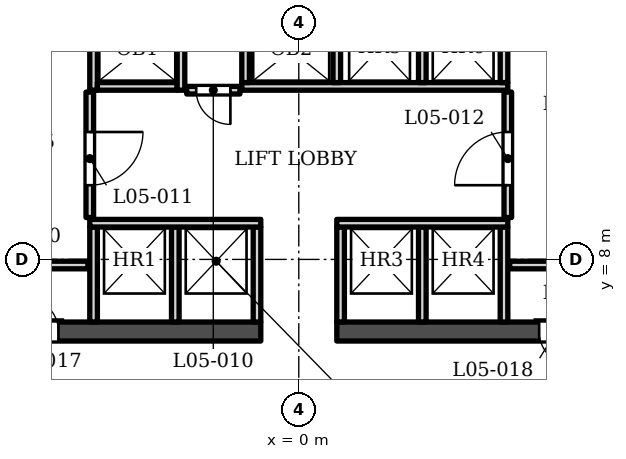
"""IFC4 building model, lengths in metres.
Left out: names, types, materials, properties, quantities, classifications, styles, units other than length and angle.
Written with IfcOpenShell. Run it as: python <this file> out.ifc"""

import sys

from ifc_helpers import new_model, si_unit, direction, frame, frame_2d, origin, place, context, subcontext, project, spatial, rectangle, extrude, element, fill, save


model = new_model("IFC4")
c1 = context("Model", 3, precision=1e-05, world=origin(), true_north=direction((0.0, 1.0)))
c2 = subcontext(c1, "Body", "Model", "MODEL_VIEW")
j1 = project(units=[si_unit("LENGTHUNIT", "METRE"), si_unit("PLANEANGLEUNIT", "RADIAN")], contexts=[c1])
p1 = place(None, origin())
s1 = spatial("IfcSite", under=j1, at=p1, CompositionType="ELEMENT")
p2 = place(p1, origin())
s2 = spatial("IfcBuilding", under=s1, at=p2, CompositionType="ELEMENT")
p3 = place(p2, frame((0.0, 0.0, 40.0)))
s3 = spatial("IfcBuildingStorey", under=s2, at=p3, CompositionType="ELEMENT", Elevation=40.0)
p4 = place(p3, frame((-8.05, 6.103, 0.0), z_axis=(0.0, 0.0, 1.0), x_axis=(1.0, 0.0, 0.0)))
e1 = element("IfcWall", 1, at=p4, inside=s3, PredefinedType="SHEAR", context=c2, shape_type="SweptSolid", body=[
    extrude(rectangle(XDim=7.05, YDim=0.5, at=frame_2d((3.525, 0.0))), origin(), (0.0, 0.0, 1.0), 6.0),
])
p5 = place(p4, frame((0.825, 0.0, 0.0)))
e2 = element("IfcOpeningElement", 2, at=p5, cuts=e1, PredefinedType="OPENING", context=c2, shape_type="SweptSolid", body=[
    extrude(rectangle(XDim=0.9, YDim=2.1, at=frame_2d((0.45, 1.05))), frame((0.0, 0.26, 0.0), z_axis=(0.0, -1.0, 0.0), x_axis=(1.0, 0.0, 0.0)), (0.0, 0.0, 1.0), 0.52),
])
p6 = place(p3, frame((1.0, 6.103, 0.0), z_axis=(0.0, 0.0, 1.0), x_axis=(1.0, 0.0, 0.0)))
e3 = element("IfcWall", 3, at=p6, inside=s3, PredefinedType="SHEAR", context=c2, shape_type="SweptSolid", body=[
    extrude(rectangle(XDim=7.05, YDim=0.5, at=frame_2d((3.525, 0.0))), origin(), (0.0, 0.0, 1.0), 6.0),
])
p7 = place(p6, frame((5.325, 0.0, 0.0)))
e4 = element("IfcOpeningElement", 4, at=p7, cuts=e3, PredefinedType="OPENING", context=c2, shape_type="SweptSolid", body=[
    extrude(rectangle(XDim=0.9, YDim=2.1, at=frame_2d((0.45, 1.05))), frame((0.0, 0.26, 0.0), z_axis=(0.0, -1.0, 0.0), x_axis=(1.0, 0.0, 0.0)), (0.0, 0.0, 1.0), 0.52),
])
for number, where, z_axis, x_axis in (
    (5, (-5.4, 6.353, 0.0), (0.0, 0.0, 1.0), (0.0, 1.0, 0.0)),
    (6, (-3.25, 6.353, 0.0), (0.0, 0.0, 1.0), (0.0, 1.0, 0.0)),
    (7, (-1.1, 6.353, 0.0), (0.0, 0.0, 1.0), (0.0, 1.0, 0.0)),
    (8, (1.1, 6.353, 0.0), (0.0, 0.0, 1.0), (0.0, 1.0, 0.0)),
    (9, (3.25, 6.353, 0.0), (0.0, 0.0, 1.0), (0.0, 1.0, 0.0)),
    (10, (5.4, 6.353, 0.0), (0.0, 0.0, 1.0), (0.0, 1.0, 0.0)),
    (11, (-8.05, 7.853, 0.0), (0.0, 0.0, 1.0), (1.0, 0.0, 0.0)),
    (12, (5.55, 7.853, 0.0), (0.0, 0.0, 1.0), (1.0, 0.0, 0.0)),
):
    element("IfcWall", number, at=place(p3, frame(where, z_axis=z_axis, x_axis=x_axis)), inside=s3, PredefinedType="SOLIDWALL", context=c2, shape_type="SweptSolid", body=[
        extrude(rectangle(XDim=2.5, YDim=0.2, at=frame_2d((1.25, 0.0))), origin(), (0.0, 0.0, 1.0), 5.55),
    ])
for number, where, z_axis, x_axis in (
    (13, (-5.5, 8.953, 0.0), (0.0, 0.0, 1.0), (1.0, 0.0, 0.0)),
    (14, (1.0, 8.953, 0.0), (0.0, 0.0, 1.0), (1.0, 0.0, 0.0)),
):
    element("IfcWall", number, at=place(p3, frame(where, z_axis=z_axis, x_axis=x_axis)), inside=s3, PredefinedType="SOLIDWALL", context=c2, shape_type="SweptSolid", body=[
        extrude(rectangle(XDim=4.5, YDim=0.2, at=frame_2d((2.25, 0.0))), origin(), (0.0, 0.0, 1.0), 5.55),
    ])
p8 = place(p3, frame((-5.5, 9.103, 0.0), z_axis=(0.0, 0.0, 1.0), x_axis=(0.0, 1.0, 0.0)))
e15 = element("IfcWall", 15, at=p8, inside=s3, PredefinedType="SOLIDWALL", context=c2, shape_type="SweptSolid", body=[
    extrude(rectangle(XDim=3.3, YDim=0.2, at=frame_2d((1.65, 0.0))), origin(), (0.0, 0.0, 1.0), 5.55),
])
p9 = place(p8, frame((0.85, 0.0, 0.0)))
e16 = element("IfcOpeningElement", 16, at=p9, cuts=e15, PredefinedType="OPENING", context=c2, shape_type="SweptSolid", body=[
    extrude(rectangle(XDim=1.4, YDim=2.1, at=frame_2d((0.7, 1.05))), frame((0.0, 0.11, 0.0), z_axis=(0.0, -1.0, 0.0), x_axis=(1.0, 0.0, 0.0)), (0.0, 0.0, 1.0), 0.22),
])
p10 = place(p3, frame((5.5, 9.103, 0.0), z_axis=(0.0, 0.0, 1.0), x_axis=(0.0, 1.0, 0.0)))
e17 = element("IfcWall", 17, at=p10, inside=s3, PredefinedType="SOLIDWALL", context=c2, shape_type="SweptSolid", body=[
    extrude(rectangle(XDim=3.3, YDim=0.2, at=frame_2d((1.65, 0.0))), origin(), (0.0, 0.0, 1.0), 5.55),
])
p11 = place(p10, frame((0.85, 0.0, 0.0)))
e18 = element("IfcOpeningElement", 18, at=p11, cuts=e17, PredefinedType="OPENING", context=c2, shape_type="SweptSolid", body=[
    extrude(rectangle(XDim=1.4, YDim=2.1, at=frame_2d((0.7, 1.05))), frame((0.0, 0.11, 0.0), z_axis=(0.0, -1.0, 0.0), x_axis=(1.0, 0.0, 0.0)), (0.0, 0.0, 1.0), 0.22),
])
p12 = place(p3, frame((-2.95, 12.453, 0.0), z_axis=(0.0, 0.0, 1.0), x_axis=(1.0, 0.0, 0.0)))
e19 = element("IfcWall", 19, at=p12, inside=s3, PredefinedType="SOLIDWALL", context=c2, shape_type="SweptSolid", body=[
    extrude(rectangle(XDim=1.4, YDim=0.2, at=frame_2d((0.7, 0.0))), origin(), (0.0, 0.0, 1.0), 5.55),
])
p13 = place(p12, frame((0.25, 0.0, 0.0)))
e20 = element("IfcOpeningElement", 20, at=p13, cuts=e19, PredefinedType="OPENING", context=c2, shape_type="SweptSolid", body=[
    extrude(rectangle(XDim=0.9, YDim=2.1, at=frame_2d((0.45, 1.05))), frame((0.0, 0.11, 0.0), z_axis=(0.0, -1.0, 0.0), x_axis=(1.0, 0.0, 0.0)), (0.0, 0.0, 1.0), 0.22),
])
p14 = place(p3, frame((-5.4, 12.453, 0.0), z_axis=(0.0, 0.0, 1.0), x_axis=(0.0, 1.0, 0.0)))
e21 = element("IfcWall", 21, at=p14, inside=s3, PredefinedType="SOLIDWALL", context=c2, shape_type="SweptSolid", body=[
    extrude(rectangle(XDim=3.0, YDim=0.2, at=frame_2d((1.5, 0.0))), origin(), (0.0, 0.0, 1.0), 5.55),
])
p15 = place(p3, frame((-5.3, 12.552, 0.0), z_axis=(0.0, 0.0, 1.0), x_axis=(1.0, 0.0, 0.0)))
e22 = element("IfcWall", 22, at=p15, inside=s3, PredefinedType="SOLIDWALL", context=c2, shape_type="SweptSolid", body=[
    extrude(rectangle(XDim=2.1, YDim=0.2, at=frame_2d((1.05, 0.0))), origin(), (0.0, 0.0, 1.0), 5.55),
])
p16 = place(p3, frame((-3.1, 12.453, 0.0), z_axis=(0.0, 0.0, 1.0), x_axis=(0.0, 1.0, 0.0)))
e23 = element("IfcWall", 23, at=p16, inside=s3, PredefinedType="SOLIDWALL", context=c2, shape_type="SweptSolid", body=[
    extrude(rectangle(XDim=3.0, YDim=0.2, at=frame_2d((1.5, 0.0))), origin(), (0.0, 0.0, 1.0), 5.55),
])
p17 = place(p3, frame((-1.5, 12.552, 0.0), z_axis=(0.0, 0.0, 1.0), x_axis=(1.0, 0.0, 0.0)))
e24 = element("IfcWall", 24, at=p17, inside=s3, PredefinedType="SOLIDWALL", context=c2, shape_type="SweptSolid", body=[
    extrude(rectangle(XDim=7.0, YDim=0.2, at=frame_2d((3.5, 0.0))), origin(), (0.0, 0.0, 1.0), 5.55),
])
for number, where, z_axis, x_axis in (
    (25, (-1.4, 12.653, 0.0), (0.0, 0.0, 1.0), (0.0, 1.0, 0.0)),
    (26, (1.0, 12.653, 0.0), (0.0, 0.0, 1.0), (0.0, 1.0, 0.0)),
    (27, (3.25, 12.653, 0.0), (0.0, 0.0, 1.0), (0.0, 1.0, 0.0)),
):
    element("IfcWall", number, at=place(p3, frame(where, z_axis=z_axis, x_axis=x_axis)), inside=s3, PredefinedType="SOLIDWALL", context=c2, shape_type="SweptSolid", body=[
        extrude(rectangle(XDim=2.6, YDim=0.2, at=frame_2d((1.3, 0.0))), origin(), (0.0, 0.0, 1.0), 5.55),
    ])
p18 = place(p3, frame((5.4, 12.653, 0.0), z_axis=(0.0, 0.0, 1.0), x_axis=(0.0, 1.0, 0.0)))
e28 = element("IfcWall", 28, at=p18, inside=s3, PredefinedType="SOLIDWALL", context=c2, shape_type="SweptSolid", body=[
    extrude(rectangle(XDim=1.6, YDim=0.2, at=frame_2d((0.8, 0.0))), origin(), (0.0, 0.0, 1.0), 5.55),
])
p19 = place(p13, origin())
e29 = element("IfcDoor", 29, at=p19, inside=s3, OperationType="SINGLE_SWING_RIGHT", PredefinedType="DOOR", context=c2, shape_type="SweptSolid", body=[
    extrude(rectangle(XDim=0.9, YDim=2.1, at=frame_2d((0.45, 1.05))), frame((0.0, 0.025, 0.0), z_axis=(0.0, -1.0, 0.0), x_axis=(1.0, 0.0, 0.0)), (0.0, 0.0, 1.0), 0.05),
])
fill(e20, e29)
p20 = place(p9, origin())
e30 = element("IfcDoor", 30, at=p20, inside=s3, OperationType="SINGLE_SWING_RIGHT", PredefinedType="DOOR", context=c2, shape_type="SweptSolid", body=[
    extrude(rectangle(XDim=1.4, YDim=2.1, at=frame_2d((0.7, 1.05))), frame((0.0, 0.025, 0.0), z_axis=(0.0, -1.0, 0.0), x_axis=(1.0, 0.0, 0.0)), (0.0, 0.0, 1.0), 0.05),
])
fill(e16, e30)
p21 = place(p11, origin())
e31 = element("IfcDoor", 31, at=p21, inside=s3, OperationType="SINGLE_SWING_LEFT", PredefinedType="DOOR", context=c2, shape_type="SweptSolid", body=[
    extrude(rectangle(XDim=1.4, YDim=2.1, at=frame_2d((0.7, 1.05))), frame((0.0, 0.025, 0.0), z_axis=(0.0, -1.0, 0.0), x_axis=(1.0, 0.0, 0.0)), (0.0, 0.0, 1.0), 0.05),
])
fill(e18, e31)
p22 = place(p5, origin())
e32 = element("IfcDoor", 32, at=p22, inside=s3, OperationType="SINGLE_SWING_LEFT", PredefinedType="DOOR", context=c2, shape_type="SweptSolid", body=[
    extrude(rectangle(XDim=0.9, YDim=2.1, at=frame_2d((0.45, 1.05))), frame((0.0, 0.025, 0.0), z_axis=(0.0, -1.0, 0.0), x_axis=(1.0, 0.0, 0.0)), (0.0, 0.0, 1.0), 0.05),
])
fill(e2, e32)
p23 = place(p7, origin())
e33 = element("IfcDoor", 33, at=p23, inside=s3, OperationType="SINGLE_SWING_RIGHT", PredefinedType="DOOR", context=c2, shape_type="SweptSolid", body=[
    extrude(rectangle(XDim=0.9, YDim=2.1, at=frame_2d((0.45, 1.05))), frame((0.0, 0.025, 0.0), z_axis=(0.0, -1.0, 0.0), x_axis=(1.0, 0.0, 0.0)), (0.0, 0.0, 1.0), 0.05),
])
fill(e4, e33)
save(model, sys.argv[1])
